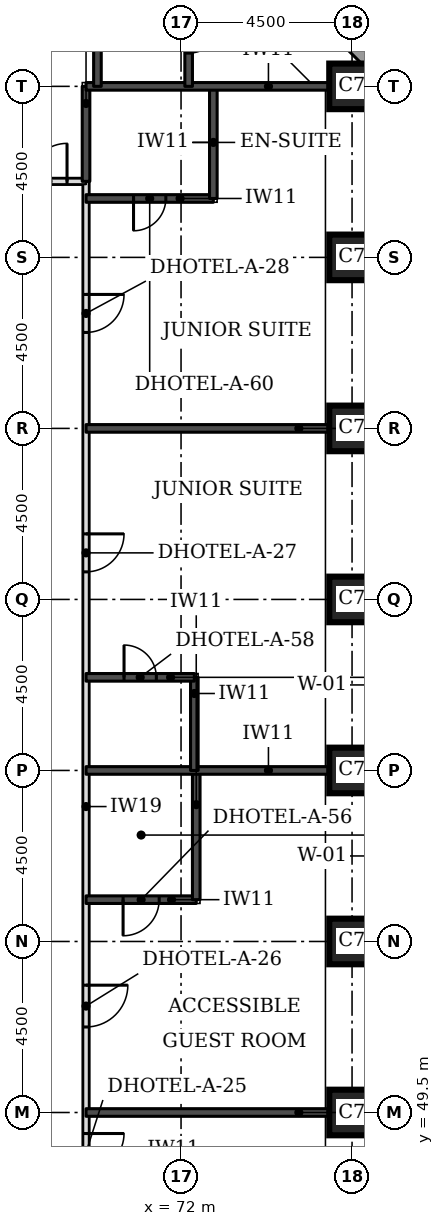
"""IFC4 building model, lengths in metres.
Left out: names, types, materials, properties, quantities, classifications, styles, units other than length and angle.
Written with IfcOpenShell. Run it as: python <this file> out.ifc"""

import sys

from ifc_helpers import new_model, si_unit, direction, frame, frame_2d, origin, origin_2d, place, context, subcontext, project, spatial, rectangle, extrude, element, fill, save


model = new_model("IFC4")
c1 = context("Model", 3, precision=1e-05, world=origin(), true_north=direction((0.0, 1.0)))
c2 = subcontext(c1, "Body", "Model", "MODEL_VIEW")
j1 = project(units=[si_unit("LENGTHUNIT", "METRE"), si_unit("PLANEANGLEUNIT", "RADIAN")], contexts=[c1])
p1 = place(None, origin())
s1 = spatial("IfcSite", under=j1, at=p1, CompositionType="ELEMENT")
p2 = place(p1, origin())
s2 = spatial("IfcBuilding", under=s1, at=p2, CompositionType="ELEMENT")
p3 = place(p2, frame((0.0, 0.0, 26.4)))
s3 = spatial("IfcBuildingStorey", under=s2, at=p3, CompositionType="ELEMENT", Elevation=26.4)
for number, where, z_axis, x_axis in (
    (1, (76.5, 49.5, 0.0), (0.0, 0.0, 1.0), (1.0, 0.0, 0.0)),
    (2, (76.5, 54.0, 0.0), (0.0, 0.0, 1.0), (1.0, 0.0, 0.0)),
    (3, (76.5, 58.5, 0.0), (0.0, 0.0, 1.0), (1.0, 0.0, 0.0)),
    (4, (76.5, 63.0, 0.0), (0.0, 0.0, 1.0), (1.0, 0.0, 0.0)),
    (5, (76.5, 67.5, 0.0), (0.0, 0.0, 1.0), (1.0, 0.0, 0.0)),
    (6, (76.5, 72.0, 0.0), (0.0, 0.0, 1.0), (1.0, 0.0, 0.0)),
    (7, (76.5, 76.5, 0.0), (0.0, 0.0, 1.0), (1.0, 0.0, 0.0)),
):
    element("IfcColumn", number, at=place(p3, frame(where, z_axis=z_axis, x_axis=x_axis)), inside=s3, PredefinedType="COLUMN", context=c2, shape_type="SweptSolid", body=[
        extrude(rectangle(XDim=1.2, YDim=1.2, at=origin_2d()), origin(), (0.0, 0.0, 1.0), 3.3),
    ])
p4 = place(p3, frame((77.326, 76.77, 0.0), z_axis=(0.0, 0.0, 1.0), x_axis=(-0.707106781187, 0.707106781187, 0.0)))
e8 = element("IfcWall", 8, at=p4, inside=s3, PredefinedType="STANDARD", context=c2, shape_type="SweptSolid", body=[
    extrude(rectangle(XDim=7.151, YDim=0.35, at=frame_2d((3.576, 0.0))), origin(), (0.0, 0.0, 1.0), 3.055),
])
p5 = place(p4, frame((1.926, 0.0, 0.8)))
e9 = element("IfcOpeningElement", 9, at=p5, cuts=e8, PredefinedType="OPENING", context=c2, shape_type="SweptSolid", body=[
    extrude(rectangle(XDim=3.3, YDim=1.5, at=frame_2d((1.65, 0.75))), frame((0.0, 0.185, 0.0), z_axis=(0.0, -1.0, 0.0), x_axis=(1.0, 0.0, 0.0)), (0.0, 0.0, 1.0), 0.37),
])
p6 = place(p3, frame((69.5, 47.5, 0.0), z_axis=(0.0, 0.0, 1.0), x_axis=(0.0, 1.0, 0.0)))
e10 = element("IfcWall", 10, at=p6, inside=s3, PredefinedType="PARTITIONING", context=c2, shape_type="SweptSolid", body=[
    extrude(rectangle(XDim=26.5, YDim=0.15, at=frame_2d((13.25, 0.0))), origin(), (0.0, 0.0, 1.0), 3.08),
])
p7 = place(p6, frame((22.525, 0.0, 0.0)))
e11 = element("IfcOpeningElement", 11, at=p7, cuts=e10, PredefinedType="OPENING", context=c2, shape_type="SweptSolid", body=[
    extrude(rectangle(XDim=1.0, YDim=2.1, at=frame_2d((0.5, 1.05))), frame((0.0, 0.085, 0.0), z_axis=(0.0, -1.0, 0.0), x_axis=(1.0, 0.0, 0.0)), (0.0, 0.0, 1.0), 0.17),
])
p8 = place(p6, frame((16.225, 0.0, 0.0)))
e12 = element("IfcOpeningElement", 12, at=p8, cuts=e10, PredefinedType="OPENING", context=c2, shape_type="SweptSolid", body=[
    extrude(rectangle(XDim=1.0, YDim=2.1, at=frame_2d((0.5, 1.05))), frame((0.0, 0.085, 0.0), z_axis=(0.0, -1.0, 0.0), x_axis=(1.0, 0.0, 0.0)), (0.0, 0.0, 1.0), 0.17),
])
p9 = place(p6, frame((4.25, 0.0, 0.0)))
e13 = element("IfcOpeningElement", 13, at=p9, cuts=e10, PredefinedType="OPENING", context=c2, shape_type="SweptSolid", body=[
    extrude(rectangle(XDim=1.1, YDim=2.1, at=frame_2d((0.55, 1.05))), frame((0.0, 0.085, 0.0), z_axis=(0.0, -1.0, 0.0), x_axis=(1.0, 0.0, 0.0)), (0.0, 0.0, 1.0), 0.17),
])
p10 = place(p6, frame((0.447, 0.0, 0.0)))
e14 = element("IfcOpeningElement", 14, at=p10, cuts=e10, PredefinedType="OPENING", context=c2, shape_type="SweptSolid", body=[
    extrude(rectangle(XDim=1.0, YDim=2.1, at=frame_2d((0.5, 1.05))), frame((0.0, 0.085, 0.0), z_axis=(0.0, -1.0, 0.0), x_axis=(1.0, 0.0, 0.0)), (0.0, 0.0, 1.0), 0.17),
])
p11 = place(p3, frame((43.0, 74.0, 0.0), z_axis=(0.0, 0.0, 1.0), x_axis=(1.0, 0.0, 0.0)))
e15 = element("IfcWall", 15, at=p11, inside=s3, PredefinedType="PARTITIONING", context=c2, shape_type="SweptSolid", body=[
    extrude(rectangle(XDim=26.5, YDim=0.15, at=frame_2d((13.25, 0.0))), origin(), (0.0, 0.0, 1.0), 3.08),
])
p12 = place(p11, frame((4.675, 0.0, 0.0)))
e16 = element("IfcOpeningElement", 16, at=p12, cuts=e15, PredefinedType="OPENING", context=c2, shape_type="SweptSolid", body=[
    extrude(rectangle(XDim=1.0, YDim=2.1, at=frame_2d((0.5, 1.05))), frame((0.0, 0.085, 0.0), z_axis=(0.0, -1.0, 0.0), x_axis=(1.0, 0.0, 0.0)), (0.0, 0.0, 1.0), 0.17),
])
p13 = place(p11, frame((9.025, 0.0, 0.0)))
e17 = element("IfcOpeningElement", 17, at=p13, cuts=e15, PredefinedType="OPENING", context=c2, shape_type="SweptSolid", body=[
    extrude(rectangle(XDim=1.0, YDim=2.1, at=frame_2d((0.5, 1.05))), frame((0.0, 0.085, 0.0), z_axis=(0.0, -1.0, 0.0), x_axis=(1.0, 0.0, 0.0)), (0.0, 0.0, 1.0), 0.17),
])
p14 = place(p11, frame((20.725, 0.0, 0.0)))
e18 = element("IfcOpeningElement", 18, at=p14, cuts=e15, PredefinedType="OPENING", context=c2, shape_type="SweptSolid", body=[
    extrude(rectangle(XDim=1.0, YDim=2.1, at=frame_2d((0.5, 1.05))), frame((0.0, 0.085, 0.0), z_axis=(0.0, -1.0, 0.0), x_axis=(1.0, 0.0, 0.0)), (0.0, 0.0, 1.0), 0.17),
])
p15 = place(p11, frame((0.5, 0.0, 0.0)))
e19 = element("IfcOpeningElement", 19, at=p15, cuts=e15, PredefinedType="OPENING", context=c2, shape_type="SweptSolid", body=[
    extrude(rectangle(XDim=1.0, YDim=2.1, at=frame_2d((0.5, 1.05))), frame((0.0, 0.085, 0.0), z_axis=(0.0, -1.0, 0.0), x_axis=(1.0, 0.0, 0.0)), (0.0, 0.0, 1.0), 0.17),
])
p16 = place(p11, frame((25.0, 0.0, 0.0)))
e20 = element("IfcOpeningElement", 20, at=p16, cuts=e15, PredefinedType="OPENING", context=c2, shape_type="SweptSolid", body=[
    extrude(rectangle(XDim=1.0, YDim=2.1, at=frame_2d((0.5, 1.05))), frame((0.0, 0.085, 0.0), z_axis=(0.0, -1.0, 0.0), x_axis=(1.0, 0.0, 0.0)), (0.0, 0.0, 1.0), 0.17),
])
p17 = place(p3, frame((69.5, 49.5, 0.0), z_axis=(0.0, 0.0, 1.0), x_axis=(1.0, 0.0, 0.0)))
e21 = element("IfcWall", 21, at=p17, inside=s3, PredefinedType="SOLIDWALL", context=c2, shape_type="SweptSolid", body=[
    extrude(rectangle(XDim=6.4, YDim=0.2, at=frame_2d((3.2, 0.0))), origin(), (0.0, 0.0, 1.0), 3.08),
])
p18 = place(p3, frame((69.5, 55.1, 0.0), z_axis=(0.0, 0.0, 1.0), x_axis=(1.0, 0.0, 0.0)))
e22 = element("IfcWall", 22, at=p18, inside=s3, PredefinedType="SOLIDWALL", context=c2, shape_type="SweptSolid", body=[
    extrude(rectangle(XDim=2.9, YDim=0.2, at=frame_2d((1.45, 0.0))), origin(), (0.0, 0.0, 1.0), 3.08),
])
p19 = place(p18, frame((0.975, 0.0, 0.0)))
e23 = element("IfcOpeningElement", 23, at=p19, cuts=e22, PredefinedType="OPENING", context=c2, shape_type="SweptSolid", body=[
    extrude(rectangle(XDim=0.95, YDim=2.1, at=frame_2d((0.475, 1.05))), frame((0.0, 0.11, 0.0), z_axis=(0.0, -1.0, 0.0), x_axis=(1.0, 0.0, 0.0)), (0.0, 0.0, 1.0), 0.22),
])
p20 = place(p3, frame((72.4, 55.1, 0.0), z_axis=(0.0, 0.0, 1.0), x_axis=(0.0, 1.0, 0.0)))
e24 = element("IfcWall", 24, at=p20, inside=s3, PredefinedType="SOLIDWALL", context=c2, shape_type="SweptSolid", body=[
    extrude(rectangle(XDim=3.4, YDim=0.2, at=frame_2d((1.7, 0.0))), origin(), (0.0, 0.0, 1.0), 3.08),
])
p21 = place(p3, frame((69.5, 58.5, 0.0), z_axis=(0.0, 0.0, 1.0), x_axis=(1.0, 0.0, 0.0)))
e25 = element("IfcWall", 25, at=p21, inside=s3, PredefinedType="SOLIDWALL", context=c2, shape_type="SweptSolid", body=[
    extrude(rectangle(XDim=6.4, YDim=0.2, at=frame_2d((3.2, 0.0))), origin(), (0.0, 0.0, 1.0), 3.08),
])
p22 = place(p3, frame((72.35, 58.5, 0.0), z_axis=(0.0, 0.0, 1.0), x_axis=(0.0, 1.0, 0.0)))
e26 = element("IfcWall", 26, at=p22, inside=s3, PredefinedType="SOLIDWALL", context=c2, shape_type="SweptSolid", body=[
    extrude(rectangle(XDim=2.45, YDim=0.2, at=frame_2d((1.225, 0.0))), origin(), (0.0, 0.0, 1.0), 3.08),
])
p23 = place(p3, frame((69.5, 60.95, 0.0), z_axis=(0.0, 0.0, 1.0), x_axis=(1.0, 0.0, 0.0)))
e27 = element("IfcWall", 27, at=p23, inside=s3, PredefinedType="SOLIDWALL", context=c2, shape_type="SweptSolid", body=[
    extrude(rectangle(XDim=2.85, YDim=0.2, at=frame_2d((1.425, 0.0))), origin(), (0.0, 0.0, 1.0), 3.08),
])
p24 = place(p23, frame((1.0, 0.0, 0.0)))
e28 = element("IfcOpeningElement", 28, at=p24, cuts=e27, PredefinedType="OPENING", context=c2, shape_type="SweptSolid", body=[
    extrude(rectangle(XDim=0.85, YDim=2.1, at=frame_2d((0.425, 1.05))), frame((0.0, 0.11, 0.0), z_axis=(0.0, -1.0, 0.0), x_axis=(1.0, 0.0, 0.0)), (0.0, 0.0, 1.0), 0.22),
])
p25 = place(p3, frame((69.5, 67.5, 0.0), z_axis=(0.0, 0.0, 1.0), x_axis=(1.0, 0.0, 0.0)))
e29 = element("IfcWall", 29, at=p25, inside=s3, PredefinedType="SOLIDWALL", context=c2, shape_type="SweptSolid", body=[
    extrude(rectangle(XDim=6.4, YDim=0.2, at=frame_2d((3.2, 0.0))), origin(), (0.0, 0.0, 1.0), 3.08),
])
p26 = place(p3, frame((69.5, 73.55, 0.0), z_axis=(0.0, 0.0, 1.0), x_axis=(1.0, 0.0, 0.0)))
e30 = element("IfcWall", 30, at=p26, inside=s3, PredefinedType="SOLIDWALL", context=c2, shape_type="SweptSolid", body=[
    extrude(rectangle(XDim=3.35, YDim=0.2, at=frame_2d((1.675, 0.0))), origin(), (0.0, 0.0, 1.0), 3.08),
])
p27 = place(p26, frame((1.25, 0.0, 0.0)))
e31 = element("IfcOpeningElement", 31, at=p27, cuts=e30, PredefinedType="OPENING", context=c2, shape_type="SweptSolid", body=[
    extrude(rectangle(XDim=0.85, YDim=2.1, at=frame_2d((0.425, 1.05))), frame((0.0, 0.11, 0.0), z_axis=(0.0, -1.0, 0.0), x_axis=(1.0, 0.0, 0.0)), (0.0, 0.0, 1.0), 0.22),
])
p28 = place(p3, frame((72.85, 73.55, 0.0), z_axis=(0.0, 0.0, 1.0), x_axis=(0.0, 1.0, 0.0)))
e32 = element("IfcWall", 32, at=p28, inside=s3, PredefinedType="SOLIDWALL", context=c2, shape_type="SweptSolid", body=[
    extrude(rectangle(XDim=2.95, YDim=0.2, at=frame_2d((1.475, 0.0))), origin(), (0.0, 0.0, 1.0), 3.08),
])
p29 = place(p3, frame((69.5, 74.0, 0.0), z_axis=(0.0, 0.0, 1.0), x_axis=(0.0, 1.0, 0.0)))
e33 = element("IfcWall", 33, at=p29, inside=s3, PredefinedType="SOLIDWALL", context=c2, shape_type="SweptSolid", body=[
    extrude(rectangle(XDim=2.5, YDim=0.2, at=frame_2d((1.25, 0.0))), origin(), (0.0, 0.0, 1.0), 3.08),
])
p30 = place(p3, frame((69.5, 76.5, 0.0), z_axis=(0.0, 0.0, 1.0), x_axis=(1.0, 0.0, 0.0)))
e34 = element("IfcWall", 34, at=p30, inside=s3, PredefinedType="SOLIDWALL", context=c2, shape_type="SweptSolid", body=[
    extrude(rectangle(XDim=6.4, YDim=0.2, at=frame_2d((3.2, 0.0))), origin(), (0.0, 0.0, 1.0), 3.08),
])
p31 = place(p3, frame((69.8, 76.5, 0.0), z_axis=(0.0, 0.0, 1.0), x_axis=(0.0, 1.0, 0.0)))
e35 = element("IfcWall", 35, at=p31, inside=s3, PredefinedType="SOLIDWALL", context=c2, shape_type="SweptSolid", body=[
    extrude(rectangle(XDim=2.5, YDim=0.2, at=frame_2d((1.25, 0.0))), origin(), (0.0, 0.0, 1.0), 3.08),
])
p32 = place(p3, frame((72.2, 76.5, 0.0), z_axis=(0.0, 0.0, 1.0), x_axis=(0.0, 1.0, 0.0)))
e36 = element("IfcWall", 36, at=p32, inside=s3, PredefinedType="SOLIDWALL", context=c2, shape_type="SweptSolid", body=[
    extrude(rectangle(XDim=2.5, YDim=0.2, at=frame_2d((1.25, 0.0))), origin(), (0.0, 0.0, 1.0), 3.08),
])
p33 = place(p32, frame((0.875, 0.0, 0.0)))
e37 = element("IfcOpeningElement", 37, at=p33, cuts=e36, PredefinedType="OPENING", context=c2, shape_type="SweptSolid", body=[
    extrude(rectangle(XDim=0.85, YDim=2.1, at=frame_2d((0.425, 1.05))), frame((0.0, 0.11, 0.0), z_axis=(0.0, -1.0, 0.0), x_axis=(1.0, 0.0, 0.0)), (0.0, 0.0, 1.0), 0.22),
])
p34 = place(p7, frame((1.0, 0.0, 0.0), z_axis=(0.0, 0.0, 1.0), x_axis=(-1.0, 0.0, 0.0)))
e38 = element("IfcDoor", 38, at=p34, inside=s3, OperationType="SINGLE_SWING_LEFT", PredefinedType="DOOR", context=c2, shape_type="SweptSolid", body=[
    extrude(rectangle(XDim=1.0, YDim=2.1, at=frame_2d((0.5, 1.05))), frame((0.0, 0.025, 0.0), z_axis=(0.0, -1.0, 0.0), x_axis=(1.0, 0.0, 0.0)), (0.0, 0.0, 1.0), 0.05),
])
fill(e11, e38)
p35 = place(p27, frame((0.85, 0.0, 0.0), z_axis=(0.0, 0.0, 1.0), x_axis=(-1.0, 0.0, 0.0)))
e39 = element("IfcDoor", 39, at=p35, inside=s3, OperationType="SINGLE_SWING_RIGHT", PredefinedType="DOOR", context=c2, shape_type="SweptSolid", body=[
    extrude(rectangle(XDim=0.85, YDim=2.1, at=frame_2d((0.425, 1.05))), frame((0.0, 0.025, 0.0), z_axis=(0.0, -1.0, 0.0), x_axis=(1.0, 0.0, 0.0)), (0.0, 0.0, 1.0), 0.05),
])
fill(e31, e39)
p36 = place(p8, frame((1.0, 0.0, 0.0), z_axis=(0.0, 0.0, 1.0), x_axis=(-1.0, 0.0, 0.0)))
e40 = element("IfcDoor", 40, at=p36, inside=s3, OperationType="SINGLE_SWING_LEFT", PredefinedType="DOOR", context=c2, shape_type="SweptSolid", body=[
    extrude(rectangle(XDim=1.0, YDim=2.1, at=frame_2d((0.5, 1.05))), frame((0.0, 0.025, 0.0), z_axis=(0.0, -1.0, 0.0), x_axis=(1.0, 0.0, 0.0)), (0.0, 0.0, 1.0), 0.05),
])
fill(e12, e40)
p37 = place(p24, origin())
e41 = element("IfcDoor", 41, at=p37, inside=s3, OperationType="SINGLE_SWING_LEFT", PredefinedType="DOOR", context=c2, shape_type="SweptSolid", body=[
    extrude(rectangle(XDim=0.85, YDim=2.1, at=frame_2d((0.425, 1.05))), frame((0.0, 0.025, 0.0), z_axis=(0.0, -1.0, 0.0), x_axis=(1.0, 0.0, 0.0)), (0.0, 0.0, 1.0), 0.05),
])
fill(e28, e41)
p38 = place(p9, frame((1.1, 0.0, 0.0), z_axis=(0.0, 0.0, 1.0), x_axis=(-1.0, 0.0, 0.0)))
e42 = element("IfcDoor", 42, at=p38, inside=s3, OperationType="SINGLE_SWING_LEFT", PredefinedType="DOOR", context=c2, shape_type="SweptSolid", body=[
    extrude(rectangle(XDim=1.1, YDim=2.1, at=frame_2d((0.55, 1.05))), frame((0.0, 0.025, 0.0), z_axis=(0.0, -1.0, 0.0), x_axis=(1.0, 0.0, 0.0)), (0.0, 0.0, 1.0), 0.05),
])
fill(e13, e42)
p39 = place(p19, frame((0.95, 0.0, 0.0), z_axis=(0.0, 0.0, 1.0), x_axis=(-1.0, 0.0, 0.0)))
e43 = element("IfcDoor", 43, at=p39, inside=s3, OperationType="SINGLE_SWING_RIGHT", PredefinedType="DOOR", context=c2, shape_type="SweptSolid", body=[
    extrude(rectangle(XDim=0.95, YDim=2.1, at=frame_2d((0.475, 1.05))), frame((0.0, 0.025, 0.0), z_axis=(0.0, -1.0, 0.0), x_axis=(1.0, 0.0, 0.0)), (0.0, 0.0, 1.0), 0.05),
])
fill(e23, e43)
p40 = place(p10, frame((1.0, 0.0, 0.0), z_axis=(0.0, 0.0, 1.0), x_axis=(-1.0, 0.0, 0.0)))
e44 = element("IfcDoor", 44, at=p40, inside=s3, OperationType="SINGLE_SWING_LEFT", PredefinedType="DOOR", context=c2, shape_type="SweptSolid", body=[
    extrude(rectangle(XDim=1.0, YDim=2.1, at=frame_2d((0.5, 1.05))), frame((0.0, 0.025, 0.0), z_axis=(0.0, -1.0, 0.0), x_axis=(1.0, 0.0, 0.0)), (0.0, 0.0, 1.0), 0.05),
])
fill(e14, e44)
p41 = place(p16, origin())
e45 = element("IfcDoor", 45, at=p41, inside=s3, OperationType="SINGLE_SWING_RIGHT", PredefinedType="DOOR", context=c2, shape_type="SweptSolid", body=[
    extrude(rectangle(XDim=1.0, YDim=2.1, at=frame_2d((0.5, 1.05))), frame((0.0, 0.025, 0.0), z_axis=(0.0, -1.0, 0.0), x_axis=(1.0, 0.0, 0.0)), (0.0, 0.0, 1.0), 0.05),
])
fill(e20, e45)
p42 = place(p33, frame((0.85, 0.0, 0.0), z_axis=(0.0, 0.0, 1.0), x_axis=(-1.0, 0.0, 0.0)))
e46 = element("IfcDoor", 46, at=p42, inside=s3, OperationType="SINGLE_SWING_LEFT", PredefinedType="DOOR", context=c2, shape_type="SweptSolid", body=[
    extrude(rectangle(XDim=0.85, YDim=2.1, at=frame_2d((0.425, 1.05))), frame((0.0, 0.025, 0.0), z_axis=(0.0, -1.0, 0.0), x_axis=(1.0, 0.0, 0.0)), (0.0, 0.0, 1.0), 0.05),
])
fill(e37, e46)
save(model, sys.argv[1])
